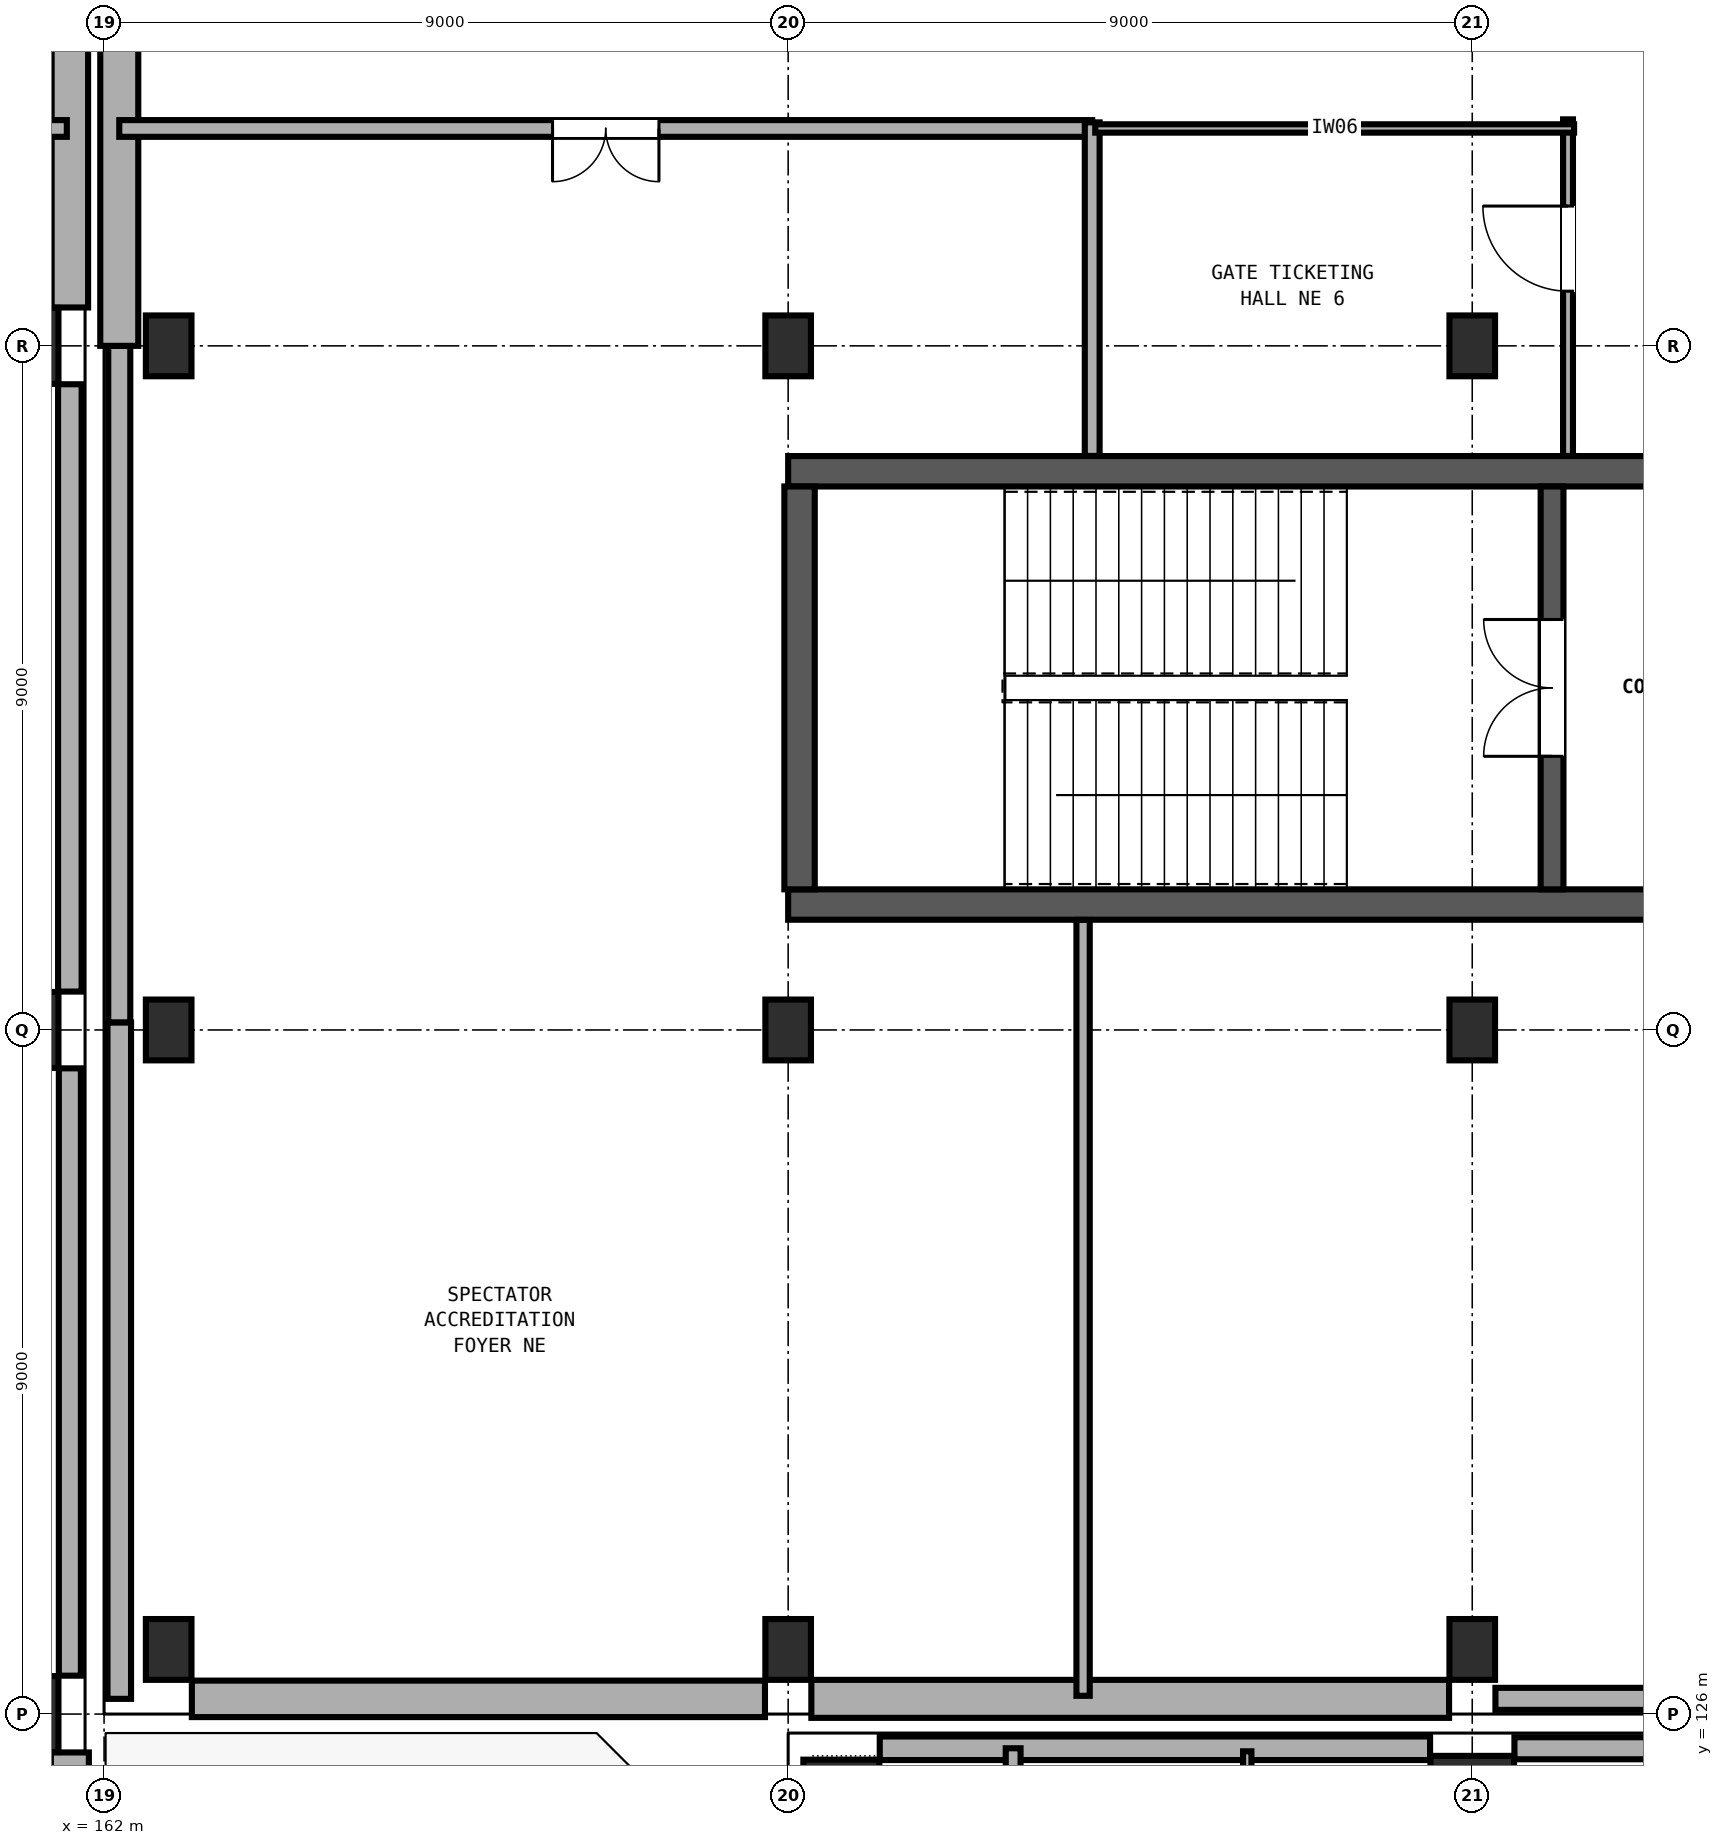
"""IFC4 building model, lengths in metres.
Left out: names, types, materials, properties, quantities, classifications, styles, units other than length and angle.
Written with IfcOpenShell. Run it as: python <this file> out.ifc"""

import sys

from ifc_helpers import new_model, si_unit, direction, frame, frame_2d, origin, origin_2d, place, context, subcontext, project, spatial, rectangle, extrude, element, fill, save


model = new_model("IFC4")
c1 = context("Model", 3, precision=1e-05, world=origin(), true_north=direction((0.0, 1.0)))
c2 = subcontext(c1, "Body", "Model", "MODEL_VIEW")
j1 = project(units=[si_unit("LENGTHUNIT", "METRE"), si_unit("PLANEANGLEUNIT", "RADIAN")], contexts=[c1])
p1 = place(None, origin())
s1 = spatial("IfcSite", under=j1, at=p1, CompositionType="ELEMENT")
p2 = place(p1, origin())
s2 = spatial("IfcBuilding", under=s1, at=p2, CompositionType="ELEMENT")
p3 = place(p2, origin())
s3 = spatial("IfcBuildingStorey", under=s2, at=p3, CompositionType="ELEMENT", Elevation=0.0)
p4 = place(p3, frame((171.7, 124.9, 0.0), z_axis=(0.0, 0.0, 1.0), x_axis=(1.0, 0.0, 0.0)))
e1 = element("IfcColumn", 1, at=p4, inside=s3, PredefinedType="COLUMN", context=c2, shape_type="SweptSolid", body=[
    extrude(rectangle(XDim=1.0, YDim=1.0, at=origin_2d()), origin(), (0.0, 0.0, 1.0), 4.8),
])
p5 = place(p3, frame((180.0, 124.9, 0.0), z_axis=(0.0, 0.0, 1.0), x_axis=(1.0, 0.0, 0.0)))
e2 = element("IfcColumn", 2, at=p5, inside=s3, PredefinedType="COLUMN", context=c2, shape_type="SweptSolid", body=[
    extrude(rectangle(XDim=1.1, YDim=1.1, at=origin_2d()), origin(), (0.0, 0.0, 1.0), 4.8),
])
for number, where, z_axis, x_axis in (
    (3, (160.9, 126.0, 0.0), (0.0, 0.0, 1.0), (1.0, 0.0, 0.0)),
    (4, (160.9, 135.0, 0.0), (0.0, 0.0, 1.0), (1.0, 0.0, 0.0)),
    (5, (160.9, 144.0, 0.0), (0.0, 0.0, 1.0), (1.0, 0.0, 0.0)),
):
    element("IfcColumn", number, at=place(p3, frame(where, z_axis=z_axis, x_axis=x_axis)), inside=s3, PredefinedType="COLUMN", context=c2, shape_type="SweptSolid", body=[
        extrude(rectangle(XDim=1.0, YDim=1.0, at=origin_2d()), origin(), (0.0, 0.0, 1.0), 4.8),
    ])
for number, where, z_axis, x_axis in (
    (6, (162.85, 126.85, 0.0), (0.0, 0.0, 1.0), (1.0, 0.0, 0.0)),
    (7, (162.85, 135.0, 0.0), (0.0, 0.0, 1.0), (1.0, 0.0, 0.0)),
    (8, (162.85, 144.0, 0.0), (0.0, 0.0, 1.0), (1.0, 0.0, 0.0)),
    (9, (171.0, 126.85, 0.0), (0.0, 0.0, 1.0), (1.0, 0.0, 0.0)),
    (10, (171.0, 135.0, 0.0), (0.0, 0.0, 1.0), (1.0, 0.0, 0.0)),
    (11, (171.0, 144.0, 0.0), (0.0, 0.0, 1.0), (1.0, 0.0, 0.0)),
    (12, (180.0, 126.85, 0.0), (0.0, 0.0, 1.0), (1.0, 0.0, 0.0)),
    (13, (180.0, 135.0, 0.0), (0.0, 0.0, 1.0), (1.0, 0.0, 0.0)),
    (14, (180.0, 144.0, 0.0), (0.0, 0.0, 1.0), (1.0, 0.0, 0.0)),
):
    element("IfcColumn", number, at=place(p3, frame(where, z_axis=z_axis, x_axis=x_axis)), inside=s3, PredefinedType="COLUMN", context=c2, shape_type="SweptSolid", body=[
        extrude(rectangle(XDim=0.6, YDim=0.8, at=origin_2d()), origin(), (0.0, 0.0, 1.0), 4.8),
    ])
p6 = place(p3, frame((171.0, 136.65, 0.0), z_axis=(0.0, 0.0, 1.0), x_axis=(1.0, 0.0, 0.0)))
e15 = element("IfcWall", 15, at=p6, inside=s3, PredefinedType="SHEAR", context=c2, shape_type="SweptSolid", body=[
    extrude(rectangle(XDim=18.0, YDim=0.4, at=frame_2d((9.0, 0.0))), origin(), (0.0, 0.0, 1.0), 4.5),
])
p7 = place(p3, frame((189.0, 142.35, 0.0), z_axis=(0.0, 0.0, 1.0), x_axis=(-1.0, 0.0, 0.0)))
e16 = element("IfcWall", 16, at=p7, inside=s3, PredefinedType="SHEAR", context=c2, shape_type="SweptSolid", body=[
    extrude(rectangle(XDim=18.0, YDim=0.4, at=frame_2d((9.0, 0.0))), origin(), (0.0, 0.0, 1.0), 4.5),
])
p8 = place(p7, frame((4.7, 0.0, 0.0)))
e17 = element("IfcOpeningElement", 17, at=p8, cuts=e16, PredefinedType="OPENING", context=c2, shape_type="SweptSolid", body=[
    extrude(rectangle(XDim=1.9, YDim=2.25, at=frame_2d((0.95, 1.125))), frame((0.0, 0.21, 0.0), z_axis=(0.0, -1.0, 0.0), x_axis=(1.0, 0.0, 0.0)), (0.0, 0.0, 1.0), 0.42),
])
p9 = place(p3, frame((171.15, 142.15, 0.0), z_axis=(0.0, 0.0, 1.0), x_axis=(0.0, -1.0, 0.0)))
e18 = element("IfcWall", 18, at=p9, inside=s3, PredefinedType="SHEAR", context=c2, shape_type="SweptSolid", body=[
    extrude(rectangle(XDim=5.3, YDim=0.4, at=frame_2d((2.65, 0.0))), origin(), (0.0, 0.0, 1.0), 4.5),
])
p10 = place(p3, frame((181.05, 136.85, 0.0), z_axis=(0.0, 0.0, 1.0), x_axis=(0.0, 1.0, 0.0)))
e19 = element("IfcWall", 19, at=p10, inside=s3, PredefinedType="SHEAR", context=c2, shape_type="SweptSolid", body=[
    extrude(rectangle(XDim=5.3, YDim=0.3, at=frame_2d((2.65, 0.0))), origin(), (0.0, 0.0, 1.0), 4.5),
])
p11 = place(p10, frame((1.75, 0.0, 0.0)))
e20 = element("IfcOpeningElement", 20, at=p11, cuts=e19, PredefinedType="OPENING", context=c2, shape_type="SweptSolid", body=[
    extrude(rectangle(XDim=1.8, YDim=2.25, at=frame_2d((0.9, 1.125))), frame((0.0, 0.16, 0.0), z_axis=(0.0, -1.0, 0.0), x_axis=(1.0, 0.0, 0.0)), (0.0, 0.0, 1.0), 0.32),
])
p12 = place(p3, frame((172.205, 125.55, 0.0), z_axis=(0.0, 0.0, 1.0), x_axis=(1.0, 0.0, 0.0)))
e21 = element("IfcWall", 21, at=p12, inside=s3, PredefinedType="SOLIDWALL", context=c2, shape_type="SweptSolid", body=[
    extrude(rectangle(XDim=7.24, YDim=0.31, at=frame_2d((3.62, 0.0))), origin(), (0.0, 0.0, 1.0), 3.28),
])
p13 = place(p3, frame((180.555, 125.55, 0.0), z_axis=(0.0, 0.0, 1.0), x_axis=(1.0, 0.0, 0.0)))
e22 = element("IfcWall", 22, at=p13, inside=s3, PredefinedType="SOLIDWALL", context=c2, shape_type="SweptSolid", body=[
    extrude(rectangle(XDim=7.94, YDim=0.29, at=frame_2d((3.97, 0.0))), origin(), (0.0, 0.0, 1.0), 3.28),
])
p14 = place(p3, frame((161.55, 152.495, 0.0), z_axis=(0.0, 0.0, 1.0), x_axis=(0.0, -1.0, 0.0)))
e23 = element("IfcWall", 23, at=p14, inside=s3, PredefinedType="SOLIDWALL", context=c2, shape_type="SweptSolid", body=[
    extrude(rectangle(XDim=7.99, YDim=0.48, at=frame_2d((3.995, 0.0))), origin(), (0.0, 0.0, 1.0), 3.28),
])
p15 = place(p3, frame((161.55, 143.495, 0.0), z_axis=(0.0, 0.0, 1.0), x_axis=(0.0, -1.0, 0.0)))
e24 = element("IfcWall", 24, at=p15, inside=s3, PredefinedType="SOLIDWALL", context=c2, shape_type="SweptSolid", body=[
    extrude(rectangle(XDim=7.99, YDim=0.31, at=frame_2d((3.995, 0.0))), origin(), (0.0, 0.0, 1.0), 3.28),
])
p16 = place(p3, frame((161.55, 134.495, 0.0), z_axis=(0.0, 0.0, 1.0), x_axis=(0.0, -1.0, 0.0)))
e25 = element("IfcWall", 25, at=p16, inside=s3, PredefinedType="SOLIDWALL", context=c2, shape_type="SweptSolid", body=[
    extrude(rectangle(XDim=7.99, YDim=0.29, at=frame_2d((3.995, 0.0))), origin(), (0.0, 0.0, 1.0), 3.28),
])
p17 = place(p3, frame((161.55, 125.495, 0.0), z_axis=(0.0, 0.0, 1.0), x_axis=(0.0, -1.0, 0.0)))
e26 = element("IfcWall", 26, at=p17, inside=s3, PredefinedType="SOLIDWALL", context=c2, shape_type="SweptSolid", body=[
    extrude(rectangle(XDim=8.295, YDim=0.5, at=frame_2d((4.147, 0.0))), origin(), (0.0, 0.0, 1.0), 3.28),
])
p18 = place(p3, frame((162.2, 126.2, 0.0), z_axis=(0.0, 0.0, 1.0), x_axis=(0.0, 1.0, 0.0)))
e27 = element("IfcWall", 27, at=p18, inside=s3, PredefinedType="SOLIDWALL", context=c2, shape_type="SweptSolid", body=[
    extrude(rectangle(XDim=8.9, YDim=0.31, at=frame_2d((4.45, 0.0))), origin(), (0.0, 0.0, 1.0), 3.28),
])
p19 = place(p3, frame((162.2, 135.1, 0.0), z_axis=(0.0, 0.0, 1.0), x_axis=(0.0, 1.0, 0.0)))
e28 = element("IfcWall", 28, at=p19, inside=s3, PredefinedType="SOLIDWALL", context=c2, shape_type="SweptSolid", body=[
    extrude(rectangle(XDim=8.9, YDim=0.29, at=frame_2d((4.45, 0.0))), origin(), (0.0, 0.0, 1.0), 3.28),
])
p20 = place(p3, frame((162.2, 144.0, 0.0), z_axis=(0.0, 0.0, 1.0), x_axis=(0.0, 1.0, 0.0)))
e29 = element("IfcWall", 29, at=p20, inside=s3, PredefinedType="SOLIDWALL", context=c2, shape_type="SweptSolid", body=[
    extrude(rectangle(XDim=8.9, YDim=0.5, at=frame_2d((4.45, 0.0))), origin(), (0.0, 0.0, 1.0), 3.28),
])
p21 = place(p3, frame((188.695, 126.2, 0.0), z_axis=(0.0, 0.0, 1.0), x_axis=(-1.0, 0.0, 0.0)))
e30 = element("IfcWall", 30, at=p21, inside=s3, PredefinedType="SOLIDWALL", context=c2, shape_type="SweptSolid", body=[
    extrude(rectangle(XDim=8.39, YDim=0.29, at=frame_2d((4.195, 0.0))), origin(), (0.0, 0.0, 1.0), 3.28),
])
p22 = place(p3, frame((179.695, 126.2, 0.0), z_axis=(0.0, 0.0, 1.0), x_axis=(-1.0, 0.0, 0.0)))
e31 = element("IfcWall", 31, at=p22, inside=s3, PredefinedType="SOLIDWALL", context=c2, shape_type="SweptSolid", body=[
    extrude(rectangle(XDim=8.39, YDim=0.5, at=frame_2d((4.195, 0.0))), origin(), (0.0, 0.0, 1.0), 3.28),
])
p23 = place(p3, frame((170.695, 126.2, 0.0), z_axis=(0.0, 0.0, 1.0), x_axis=(-1.0, 0.0, 0.0)))
e32 = element("IfcWall", 32, at=p23, inside=s3, PredefinedType="SOLIDWALL", context=c2, shape_type="SweptSolid", body=[
    extrude(rectangle(XDim=7.54, YDim=0.48, at=frame_2d((3.77, 0.0))), origin(), (0.0, 0.0, 1.0), 3.28),
])
p24 = place(p3, frame((177.04, 102.81, 0.0), z_axis=(0.0, 0.0, 1.0), x_axis=(0.0, 1.0, 0.0)))
e33 = element("IfcWall", 33, at=p24, inside=s3, PredefinedType="PARTITIONING", context=c2, shape_type="SweptSolid", body=[
    extrude(rectangle(XDim=22.7, YDim=0.11, at=frame_2d((11.35, 0.0))), origin(), (0.0, 0.0, 1.0), 3.28),
])
p25 = place(p3, frame((173.96, 107.658, 0.0), z_axis=(0.0, 0.0, 1.0), x_axis=(0.0, 1.0, 0.0)))
e34 = element("IfcWall", 34, at=p25, inside=s3, PredefinedType="PARTITIONING", context=c2, shape_type="SweptSolid", body=[
    extrude(rectangle(XDim=17.892, YDim=0.195, at=frame_2d((8.946, 0.0))), origin(), (0.0, 0.0, 1.0), 3.28),
])
p26 = place(p25, frame((6.253, 0.0, 0.0)))
e35 = element("IfcOpeningElement", 35, at=p26, cuts=e34, PredefinedType="OPENING", context=c2, shape_type="SweptSolid", body=[
    extrude(rectangle(XDim=1.15, YDim=2.15, at=frame_2d((0.575, 1.075))), frame((0.0, 0.107, 0.0), z_axis=(0.0, -1.0, 0.0), x_axis=(1.0, 0.0, 0.0)), (0.0, 0.0, 1.0), 0.215),
])
p27 = place(p3, frame((149.56, 146.86, 0.0), z_axis=(0.0, 0.0, 1.0), x_axis=(1.0, 0.0, 0.0)))
e36 = element("IfcWall", 36, at=p27, inside=s3, PredefinedType="PARTITIONING", context=c2, shape_type="SweptSolid", body=[
    extrude(rectangle(XDim=11.95, YDim=0.22, at=frame_2d((5.975, 0.0))), origin(), (0.0, 0.0, 1.0), 3.28),
])
p28 = place(p3, frame((175.0, 146.86, 0.0), z_axis=(0.0, 0.0, 1.0), x_axis=(-1.0, 0.0, 0.0)))
e37 = element("IfcWall", 37, at=p28, inside=s3, PredefinedType="PARTITIONING", context=c2, shape_type="SweptSolid", body=[
    extrude(rectangle(XDim=12.8, YDim=0.22, at=frame_2d((6.4, 0.0))), origin(), (0.0, 0.0, 1.0), 3.28),
])
p29 = place(p28, frame((5.7, 0.0, 0.0)))
e38 = element("IfcOpeningElement", 38, at=p29, cuts=e37, PredefinedType="OPENING", context=c2, shape_type="SweptSolid", body=[
    extrude(rectangle(XDim=1.4, YDim=2.15, at=frame_2d((0.7, 1.075))), frame((0.0, 0.12, 0.0), z_axis=(0.0, -1.0, 0.0), x_axis=(1.0, 0.0, 0.0)), (0.0, 0.0, 1.0), 0.24),
])
p30 = place(p3, frame((175.0, 146.94, 0.0), z_axis=(0.0, 0.0, 1.0), x_axis=(0.0, -1.0, 0.0)))
e39 = element("IfcWall", 39, at=p30, inside=s3, PredefinedType="PARTITIONING", context=c2, shape_type="SweptSolid", body=[
    extrude(rectangle(XDim=4.388, YDim=0.195, at=frame_2d((2.194, 0.0))), origin(), (0.0, 0.0, 1.0), 3.28),
])
p31 = place(p3, frame((174.88, 136.448, 0.0), z_axis=(0.0, 0.0, 1.0), x_axis=(0.0, -1.0, 0.0)))
e40 = element("IfcWall", 40, at=p31, inside=s3, PredefinedType="PARTITIONING", context=c2, shape_type="SweptSolid", body=[
    extrude(rectangle(XDim=10.208, YDim=0.175, at=frame_2d((5.104, 0.0))), origin(), (0.0, 0.0, 1.0), 3.28),
])
p32 = place(p3, frame((181.26, 142.552, 0.0), z_axis=(0.0, 0.0, 1.0), x_axis=(0.0, 1.0, 0.0)))
e41 = element("IfcWall", 41, at=p32, inside=s3, PredefinedType="PARTITIONING", context=c2, shape_type="SweptSolid", body=[
    extrude(rectangle(XDim=4.428, YDim=0.13, at=frame_2d((2.214, 0.0))), origin(), (0.0, 0.0, 1.0), 3.28),
])
p33 = place(p32, frame((2.167, 0.0, 0.0)))
e42 = element("IfcOpeningElement", 42, at=p33, cuts=e41, PredefinedType="OPENING", context=c2, shape_type="SweptSolid", body=[
    extrude(rectangle(XDim=1.12, YDim=2.22, at=frame_2d((0.56, 1.11))), frame((0.0, 0.075, 0.0), z_axis=(0.0, -1.0, 0.0), x_axis=(1.0, 0.0, 0.0)), (0.0, 0.0, 1.0), 0.15),
])
p34 = place(p3, frame((175.04, 146.86, 0.0), z_axis=(0.0, 0.0, 1.0), x_axis=(1.0, 0.0, 0.0)))
e43 = element("IfcWall", 43, at=p34, inside=s3, PredefinedType="PARTITIONING", context=c2, shape_type="SweptSolid", body=[
    extrude(rectangle(XDim=6.3, YDim=0.11, at=frame_2d((3.15, 0.0))), origin(), (0.0, 0.0, 1.0), 3.28),
])
p35 = place(p11, origin())
e44 = element("IfcDoor", 44, at=p35, inside=s3, OperationType="DOUBLE_DOOR_SINGLE_SWING", PredefinedType="DOOR", context=c2, shape_type="SweptSolid", body=[
    extrude(rectangle(XDim=1.8, YDim=2.25, at=frame_2d((0.9, 1.125))), frame((0.0, 0.025, 0.0), z_axis=(0.0, -1.0, 0.0), x_axis=(1.0, 0.0, 0.0)), (0.0, 0.0, 1.0), 0.05),
])
fill(e20, e44)
p36 = place(p29, origin())
e45 = element("IfcDoor", 45, at=p36, inside=s3, OperationType="DOUBLE_DOOR_SINGLE_SWING", PredefinedType="DOOR", context=c2, shape_type="SweptSolid", body=[
    extrude(rectangle(XDim=1.4, YDim=2.15, at=frame_2d((0.7, 1.075))), frame((0.0, 0.025, 0.0), z_axis=(0.0, -1.0, 0.0), x_axis=(1.0, 0.0, 0.0)), (0.0, 0.0, 1.0), 0.05),
])
fill(e38, e45)
p37 = place(p33, origin())
e46 = element("IfcDoor", 46, at=p37, inside=s3, OperationType="SINGLE_SWING_RIGHT", PredefinedType="DOOR", context=c2, shape_type="SweptSolid", body=[
    extrude(rectangle(XDim=1.12, YDim=2.22, at=frame_2d((0.56, 1.11))), frame((0.0, 0.025, 0.0), z_axis=(0.0, -1.0, 0.0), x_axis=(1.0, 0.0, 0.0)), (0.0, 0.0, 1.0), 0.05),
])
fill(e42, e46)
save(model, sys.argv[1])
